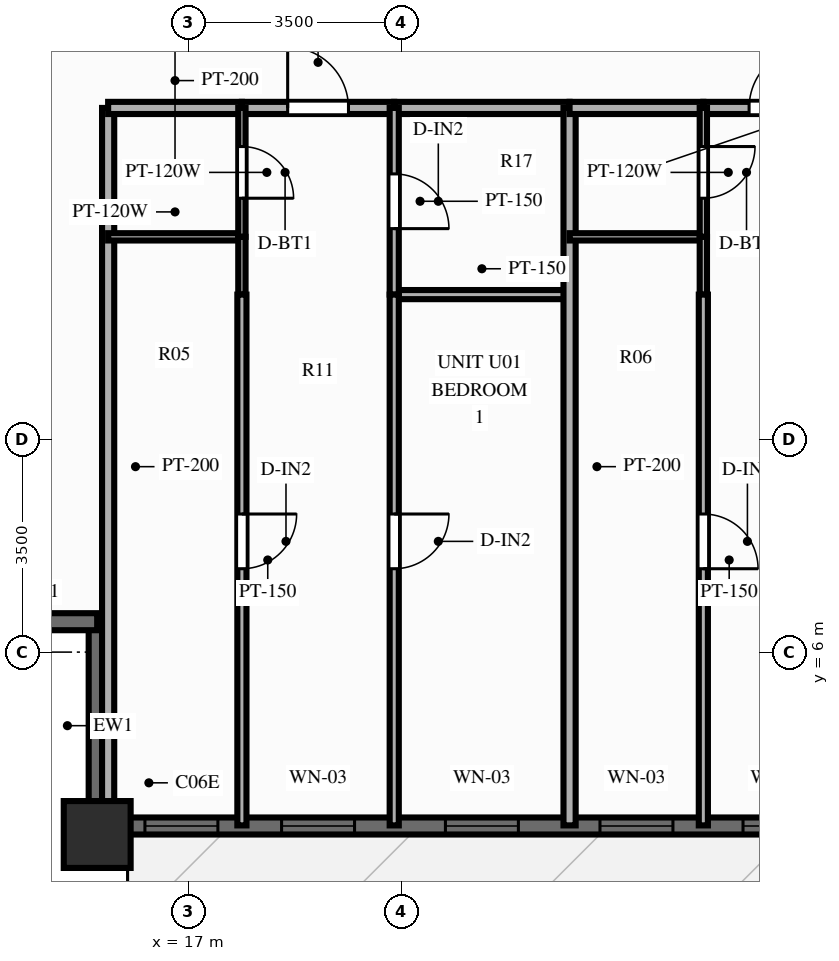
"""IFC4 building model, lengths in metres.
Left out: names, types, materials, properties, quantities, classifications, styles, units other than length and angle.
Written with IfcOpenShell. Run it as: python <this file> out.ifc"""

import sys

from ifc_helpers import new_model, si_unit, direction, frame, frame_2d, origin, origin_2d, place, context, subcontext, project, spatial, rectangle, extrude, source, transform, mapped, element, fill, save


model = new_model("IFC4")
c1 = context("Model", 3, precision=1e-05, world=origin(), true_north=direction((0.0, 1.0)))
c2 = subcontext(c1, "Body", "Model", "MODEL_VIEW")
j1 = project(units=[si_unit("LENGTHUNIT", "METRE"), si_unit("PLANEANGLEUNIT", "RADIAN")], contexts=[c1])
p1 = place(None, origin())
s1 = spatial("IfcSite", under=j1, at=p1, CompositionType="ELEMENT")
p2 = place(p1, origin())
s2 = spatial("IfcBuilding", under=s1, at=p2, CompositionType="ELEMENT")
p3 = place(p2, frame((0.0, 0.0, 22.4)))
s3 = spatial("IfcBuildingStorey", under=s2, at=p3, CompositionType="ELEMENT", Elevation=22.4)
m1 = source(origin(), c2, "Body", "SweptSolid", [
    extrude(rectangle(XDim=1.1, YDim=1.1, at=origin_2d()), origin(), (0.0, 0.0, 1.0), 3.0),
])
p4 = place(p3, frame((15.5, 3.0, 0.0), z_axis=(0.0, 0.0, 1.0), x_axis=(1.0, 0.0, 0.0)))
e1 = element("IfcColumn", 1, at=p4, inside=s3, PredefinedType="COLUMN", context=c2, shape_type="MappedRepresentation", body=[
    mapped(m1, transform((0.0, 0.0, 0.0), scale=1.0)),
])
p5 = place(p3, frame((15.5, 3.14, 0.0), z_axis=(0.0, 0.0, 1.0), x_axis=(1.0, 0.0, 0.0)))
e2 = element("IfcWall", 2, at=p5, inside=s3, PredefinedType="SOLIDWALL", context=c2, shape_type="SweptSolid", body=[
    extrude(rectangle(XDim=45.0, YDim=0.28, at=frame_2d((22.5, 0.0))), origin(), (0.0, 0.0, 1.0), 2.28),
])
p6 = place(p5, frame((0.785, 0.0, 0.25)))
e3 = element("IfcOpeningElement", 3, at=p6, cuts=e2, PredefinedType="OPENING", context=c2, shape_type="SweptSolid", body=[
    extrude(rectangle(XDim=1.2, YDim=1.5, at=frame_2d((0.6, 0.75))), frame((0.0, 0.152, 0.0), z_axis=(0.0, -1.0, 0.0), x_axis=(1.0, 0.0, 0.0)), (0.0, 0.0, 1.0), 0.304),
])
p7 = place(p5, frame((3.033, 0.0, 0.25)))
e4 = element("IfcOpeningElement", 4, at=p7, cuts=e2, PredefinedType="OPENING", context=c2, shape_type="SweptSolid", body=[
    extrude(rectangle(XDim=1.2, YDim=1.5, at=frame_2d((0.6, 0.75))), frame((0.0, 0.152, 0.0), z_axis=(0.0, -1.0, 0.0), x_axis=(1.0, 0.0, 0.0)), (0.0, 0.0, 1.0), 0.304),
])
p8 = place(p5, frame((5.727, 0.0, 0.25)))
e5 = element("IfcOpeningElement", 5, at=p8, cuts=e2, PredefinedType="OPENING", context=c2, shape_type="SweptSolid", body=[
    extrude(rectangle(XDim=1.2, YDim=1.5, at=frame_2d((0.6, 0.75))), frame((0.0, 0.152, 0.0), z_axis=(0.0, -1.0, 0.0), x_axis=(1.0, 0.0, 0.0)), (0.0, 0.0, 1.0), 0.304),
])
p9 = place(p5, frame((8.269, 0.0, 0.25)))
e6 = element("IfcOpeningElement", 6, at=p9, cuts=e2, PredefinedType="OPENING", context=c2, shape_type="SweptSolid", body=[
    extrude(rectangle(XDim=1.2, YDim=1.5, at=frame_2d((0.6, 0.75))), frame((0.0, 0.152, 0.0), z_axis=(0.0, -1.0, 0.0), x_axis=(1.0, 0.0, 0.0)), (0.0, 0.0, 1.0), 0.304),
])
p10 = place(p5, frame((10.621, 0.0, 0.25)))
e7 = element("IfcOpeningElement", 7, at=p10, cuts=e2, PredefinedType="OPENING", context=c2, shape_type="SweptSolid", body=[
    extrude(rectangle(XDim=1.2, YDim=1.5, at=frame_2d((0.6, 0.75))), frame((0.0, 0.152, 0.0), z_axis=(0.0, -1.0, 0.0), x_axis=(1.0, 0.0, 0.0)), (0.0, 0.0, 1.0), 0.304),
])
p11 = place(p5, frame((13.316, 0.0, 0.25)))
e8 = element("IfcOpeningElement", 8, at=p11, cuts=e2, PredefinedType="OPENING", context=c2, shape_type="SweptSolid", body=[
    extrude(rectangle(XDim=1.2, YDim=1.5, at=frame_2d((0.6, 0.75))), frame((0.0, 0.152, 0.0), z_axis=(0.0, -1.0, 0.0), x_axis=(1.0, 0.0, 0.0)), (0.0, 0.0, 1.0), 0.304),
])
p12 = place(p5, frame((16.624, 0.0, 0.25)))
e9 = element("IfcOpeningElement", 9, at=p12, cuts=e2, PredefinedType="OPENING", context=c2, shape_type="SweptSolid", body=[
    extrude(rectangle(XDim=0.7, YDim=1.5, at=frame_2d((0.35, 0.75))), frame((0.0, 0.152, 0.0), z_axis=(0.0, -1.0, 0.0), x_axis=(1.0, 0.0, 0.0)), (0.0, 0.0, 1.0), 0.304),
])
p13 = place(p5, frame((18.141, 0.0, 0.25)))
e10 = element("IfcOpeningElement", 10, at=p13, cuts=e2, PredefinedType="OPENING", context=c2, shape_type="SweptSolid", body=[
    extrude(rectangle(XDim=1.2, YDim=1.5, at=frame_2d((0.6, 0.75))), frame((0.0, 0.152, 0.0), z_axis=(0.0, -1.0, 0.0), x_axis=(1.0, 0.0, 0.0)), (0.0, 0.0, 1.0), 0.304),
])
p14 = place(p5, frame((21.874, 0.0, 0.0), z_axis=(0.0, 0.0, 1.0), x_axis=(-1.0, 0.0, 0.0)))
e11 = element("IfcOpeningElement", 11, at=p14, cuts=e2, PredefinedType="OPENING", context=c2, shape_type="SweptSolid", body=[
    extrude(rectangle(XDim=1.1, YDim=2.15, at=frame_2d((0.55, 1.075))), frame((0.0, 0.152, 0.0), z_axis=(0.0, -1.0, 0.0), x_axis=(1.0, 0.0, 0.0)), (0.0, 0.0, 1.0), 0.304),
])
p15 = place(p5, frame((23.223, 0.0, 0.25)))
e12 = element("IfcOpeningElement", 12, at=p15, cuts=e2, PredefinedType="OPENING", context=c2, shape_type="SweptSolid", body=[
    extrude(rectangle(XDim=1.2, YDim=1.5, at=frame_2d((0.6, 0.75))), frame((0.0, 0.152, 0.0), z_axis=(0.0, -1.0, 0.0), x_axis=(1.0, 0.0, 0.0)), (0.0, 0.0, 1.0), 0.304),
])
p16 = place(p5, frame((25.507, 0.0, 0.25)))
e13 = element("IfcOpeningElement", 13, at=p16, cuts=e2, PredefinedType="OPENING", context=c2, shape_type="SweptSolid", body=[
    extrude(rectangle(XDim=1.2, YDim=1.5, at=frame_2d((0.6, 0.75))), frame((0.0, 0.152, 0.0), z_axis=(0.0, -1.0, 0.0), x_axis=(1.0, 0.0, 0.0)), (0.0, 0.0, 1.0), 0.304),
])
p17 = place(p5, frame((27.6, 0.0, 0.25)))
e14 = element("IfcOpeningElement", 14, at=p17, cuts=e2, PredefinedType="OPENING", context=c2, shape_type="SweptSolid", body=[
    extrude(rectangle(XDim=0.7, YDim=1.5, at=frame_2d((0.35, 0.75))), frame((0.0, 0.152, 0.0), z_axis=(0.0, -1.0, 0.0), x_axis=(1.0, 0.0, 0.0)), (0.0, 0.0, 1.0), 0.304),
])
p18 = place(p5, frame((30.589, 0.0, 0.25)))
e15 = element("IfcOpeningElement", 15, at=p18, cuts=e2, PredefinedType="OPENING", context=c2, shape_type="SweptSolid", body=[
    extrude(rectangle(XDim=1.2, YDim=1.5, at=frame_2d((0.6, 0.75))), frame((0.0, 0.152, 0.0), z_axis=(0.0, -1.0, 0.0), x_axis=(1.0, 0.0, 0.0)), (0.0, 0.0, 1.0), 0.304),
])
p19 = place(p5, frame((32.872, 0.0, 0.25)))
e16 = element("IfcOpeningElement", 16, at=p19, cuts=e2, PredefinedType="OPENING", context=c2, shape_type="SweptSolid", body=[
    extrude(rectangle(XDim=1.2, YDim=1.5, at=frame_2d((0.6, 0.75))), frame((0.0, 0.152, 0.0), z_axis=(0.0, -1.0, 0.0), x_axis=(1.0, 0.0, 0.0)), (0.0, 0.0, 1.0), 0.304),
])
p20 = place(p5, frame((35.455, 0.0, 0.25)))
e17 = element("IfcOpeningElement", 17, at=p20, cuts=e2, PredefinedType="OPENING", context=c2, shape_type="SweptSolid", body=[
    extrude(rectangle(XDim=1.2, YDim=1.5, at=frame_2d((0.6, 0.75))), frame((0.0, 0.152, 0.0), z_axis=(0.0, -1.0, 0.0), x_axis=(1.0, 0.0, 0.0)), (0.0, 0.0, 1.0), 0.304),
])
p21 = place(p5, frame((37.954, 0.0, 0.25)))
e18 = element("IfcOpeningElement", 18, at=p21, cuts=e2, PredefinedType="OPENING", context=c2, shape_type="SweptSolid", body=[
    extrude(rectangle(XDim=1.2, YDim=1.5, at=frame_2d((0.6, 0.75))), frame((0.0, 0.152, 0.0), z_axis=(0.0, -1.0, 0.0), x_axis=(1.0, 0.0, 0.0)), (0.0, 0.0, 1.0), 0.304),
])
p22 = place(p5, frame((40.238, 0.0, 0.25)))
e19 = element("IfcOpeningElement", 19, at=p22, cuts=e2, PredefinedType="OPENING", context=c2, shape_type="SweptSolid", body=[
    extrude(rectangle(XDim=1.2, YDim=1.5, at=frame_2d((0.6, 0.75))), frame((0.0, 0.152, 0.0), z_axis=(0.0, -1.0, 0.0), x_axis=(1.0, 0.0, 0.0)), (0.0, 0.0, 1.0), 0.304),
])
p23 = place(p5, frame((42.716, 0.0, 0.25)))
e20 = element("IfcOpeningElement", 20, at=p23, cuts=e2, PredefinedType="OPENING", context=c2, shape_type="SweptSolid", body=[
    extrude(rectangle(XDim=1.2, YDim=1.5, at=frame_2d((0.6, 0.75))), frame((0.0, 0.152, 0.0), z_axis=(0.0, -1.0, 0.0), x_axis=(1.0, 0.0, 0.0)), (0.0, 0.0, 1.0), 0.304),
])
for number, where, z_axis, x_axis in (
    (21, (15.5, 3.08, 0.0), (0.0, 0.0, 1.0), (0.0, 1.0, 0.0)),
    (22, (12.08, 6.5, 0.0), (0.0, 0.0, 1.0), (1.0, 0.0, 0.0)),
):
    element("IfcWall", number, at=place(p3, frame(where, z_axis=z_axis, x_axis=x_axis)), inside=s3, PredefinedType="SOLIDWALL", context=c2, shape_type="SweptSolid", body=[
        extrude(rectangle(XDim=3.42, YDim=0.28, at=frame_2d((1.71, 0.0))), origin(), (0.0, 0.0, 1.0), 2.28),
    ])
p24 = place(p3, frame((15.68, 14.95, 0.0), z_axis=(0.0, 0.0, 1.0), x_axis=(0.0, -1.0, 0.0)))
e23 = element("IfcWall", 23, at=p24, inside=s3, PredefinedType="PARTITIONING", context=c2, shape_type="SweptSolid", body=[
    extrude(rectangle(XDim=11.8, YDim=0.2, at=frame_2d((5.9, 0.0))), origin(), (0.0, 0.0, 1.0), 2.79),
])
p25 = place(p3, frame((15.68, 14.95, 0.0), z_axis=(0.0, 0.0, 1.0), x_axis=(1.0, 0.0, 0.0)))
e24 = element("IfcWall", 24, at=p25, inside=s3, PredefinedType="PARTITIONING", context=c2, shape_type="SweptSolid", body=[
    extrude(rectangle(XDim=2.2, YDim=0.2, at=frame_2d((1.1, 0.0))), origin(), (0.0, 0.0, 1.0), 2.79),
])
p26 = place(p3, frame((17.88, 14.95, 0.0), z_axis=(0.0, 0.0, 1.0), x_axis=(1.0, 0.0, 0.0)))
e25 = element("IfcWall", 25, at=p26, inside=s3, PredefinedType="PARTITIONING", context=c2, shape_type="SweptSolid", body=[
    extrude(rectangle(XDim=2.505, YDim=0.2, at=frame_2d((1.252, 0.0))), origin(), (0.0, 0.0, 1.0), 2.79),
])
p27 = place(p26, frame((0.753, 0.0, 0.0)))
e26 = element("IfcOpeningElement", 26, at=p27, cuts=e25, PredefinedType="OPENING", context=c2, shape_type="SweptSolid", body=[
    extrude(rectangle(XDim=1.0, YDim=2.15, at=frame_2d((0.5, 1.075))), frame((0.0, 0.112, 0.0), z_axis=(0.0, -1.0, 0.0), x_axis=(1.0, 0.0, 0.0)), (0.0, 0.0, 1.0), 0.224),
])
p28 = place(p3, frame((20.385, 14.95, 0.0), z_axis=(0.0, 0.0, 1.0), x_axis=(1.0, 0.0, 0.0)))
e27 = element("IfcWall", 27, at=p28, inside=s3, PredefinedType="PARTITIONING", context=c2, shape_type="SweptSolid", body=[
    extrude(rectangle(XDim=2.884, YDim=0.2, at=frame_2d((1.442, 0.0))), origin(), (0.0, 0.0, 1.0), 2.79),
])
p29 = place(p3, frame((15.68, 12.83, 0.0), z_axis=(0.0, 0.0, 1.0), x_axis=(1.0, 0.0, 0.0)))
e28 = element("IfcWall", 28, at=p29, inside=s3, PredefinedType="PARTITIONING", context=c2, shape_type="SweptSolid", body=[
    extrude(rectangle(XDim=2.2, YDim=0.12, at=frame_2d((1.1, 0.0))), origin(), (0.0, 0.0, 1.0), 2.79),
])
p30 = place(p3, frame((20.385, 11.88, 0.0), z_axis=(0.0, 0.0, 1.0), x_axis=(1.0, 0.0, 0.0)))
e29 = element("IfcWall", 29, at=p30, inside=s3, PredefinedType="PARTITIONING", context=c2, shape_type="SweptSolid", body=[
    extrude(rectangle(XDim=2.884, YDim=0.15, at=frame_2d((1.442, 0.0))), origin(), (0.0, 0.0, 1.0), 2.79),
])
p31 = place(p3, frame((17.88, 14.95, 0.0), z_axis=(0.0, 0.0, 1.0), x_axis=(0.0, -1.0, 0.0)))
e30 = element("IfcWall", 30, at=p31, inside=s3, PredefinedType="PARTITIONING", context=c2, shape_type="SweptSolid", body=[
    extrude(rectangle(XDim=2.12, YDim=0.12, at=frame_2d((1.06, 0.0))), origin(), (0.0, 0.0, 1.0), 2.79),
])
p32 = place(p31, frame((0.635, 0.0, 0.0)))
e31 = element("IfcOpeningElement", 31, at=p32, cuts=e30, PredefinedType="OPENING", context=c2, shape_type="SweptSolid", body=[
    extrude(rectangle(XDim=0.85, YDim=2.05, at=frame_2d((0.425, 1.025))), frame((0.0, 0.072, 0.0), z_axis=(0.0, -1.0, 0.0), x_axis=(1.0, 0.0, 0.0)), (0.0, 0.0, 1.0), 0.144),
])
p33 = place(p3, frame((17.88, 12.83, 0.0), z_axis=(0.0, 0.0, 1.0), x_axis=(0.0, -1.0, 0.0)))
e32 = element("IfcWall", 32, at=p33, inside=s3, PredefinedType="PARTITIONING", context=c2, shape_type="SweptSolid", body=[
    extrude(rectangle(XDim=0.95, YDim=0.12, at=frame_2d((0.475, 0.0))), origin(), (0.0, 0.0, 1.0), 2.79),
])
p34 = place(p3, frame((17.88, 11.88, 0.0), z_axis=(0.0, 0.0, 1.0), x_axis=(0.0, -1.0, 0.0)))
e33 = element("IfcWall", 33, at=p34, inside=s3, PredefinedType="PARTITIONING", context=c2, shape_type="SweptSolid", body=[
    extrude(rectangle(XDim=8.73, YDim=0.15, at=frame_2d((4.365, 0.0))), origin(), (0.0, 0.0, 1.0), 2.79),
])
p35 = place(p34, frame((3.609, 0.0, 0.0)))
e34 = element("IfcOpeningElement", 34, at=p35, cuts=e33, PredefinedType="OPENING", context=c2, shape_type="SweptSolid", body=[
    extrude(rectangle(XDim=0.9, YDim=2.1, at=frame_2d((0.45, 1.05))), frame((0.0, 0.087, 0.0), z_axis=(0.0, -1.0, 0.0), x_axis=(1.0, 0.0, 0.0)), (0.0, 0.0, 1.0), 0.174),
])
p36 = place(p3, frame((20.385, 14.95, 0.0), z_axis=(0.0, 0.0, 1.0), x_axis=(0.0, -1.0, 0.0)))
e35 = element("IfcWall", 35, at=p36, inside=s3, PredefinedType="PARTITIONING", context=c2, shape_type="SweptSolid", body=[
    extrude(rectangle(XDim=3.07, YDim=0.15, at=frame_2d((1.535, 0.0))), origin(), (0.0, 0.0, 1.0), 2.79),
])
p37 = place(p36, frame((1.085, 0.0, 0.0)))
e36 = element("IfcOpeningElement", 36, at=p37, cuts=e35, PredefinedType="OPENING", context=c2, shape_type="SweptSolid", body=[
    extrude(rectangle(XDim=0.9, YDim=2.1, at=frame_2d((0.45, 1.05))), frame((0.0, 0.087, 0.0), z_axis=(0.0, -1.0, 0.0), x_axis=(1.0, 0.0, 0.0)), (0.0, 0.0, 1.0), 0.174),
])
p38 = place(p3, frame((20.385, 11.88, 0.0), z_axis=(0.0, 0.0, 1.0), x_axis=(0.0, -1.0, 0.0)))
e37 = element("IfcWall", 37, at=p38, inside=s3, PredefinedType="PARTITIONING", context=c2, shape_type="SweptSolid", body=[
    extrude(rectangle(XDim=8.73, YDim=0.15, at=frame_2d((4.365, 0.0))), origin(), (0.0, 0.0, 1.0), 2.79),
])
p39 = place(p38, frame((3.609, 0.0, 0.0)))
e38 = element("IfcOpeningElement", 38, at=p39, cuts=e37, PredefinedType="OPENING", context=c2, shape_type="SweptSolid", body=[
    extrude(rectangle(XDim=0.9, YDim=2.1, at=frame_2d((0.45, 1.05))), frame((0.0, 0.087, 0.0), z_axis=(0.0, -1.0, 0.0), x_axis=(1.0, 0.0, 0.0)), (0.0, 0.0, 1.0), 0.174),
])
p40 = place(p3, frame((23.269, 14.95, 0.0), z_axis=(0.0, 0.0, 1.0), x_axis=(0.0, -1.0, 0.0)))
e39 = element("IfcWall", 39, at=p40, inside=s3, PredefinedType="PARTITIONING", context=c2, shape_type="SweptSolid", body=[
    extrude(rectangle(XDim=11.8, YDim=0.2, at=frame_2d((5.9, 0.0))), origin(), (0.0, 0.0, 1.0), 2.79),
])
p41 = place(p3, frame((23.269, 14.95, 0.0), z_axis=(0.0, 0.0, 1.0), x_axis=(1.0, 0.0, 0.0)))
e40 = element("IfcWall", 40, at=p41, inside=s3, PredefinedType="PARTITIONING", context=c2, shape_type="SweptSolid", body=[
    extrude(rectangle(XDim=2.2, YDim=0.2, at=frame_2d((1.1, 0.0))), origin(), (0.0, 0.0, 1.0), 2.79),
])
p42 = place(p3, frame((25.469, 14.95, 0.0), z_axis=(0.0, 0.0, 1.0), x_axis=(1.0, 0.0, 0.0)))
e41 = element("IfcWall", 41, at=p42, inside=s3, PredefinedType="PARTITIONING", context=c2, shape_type="SweptSolid", body=[
    extrude(rectangle(XDim=2.505, YDim=0.2, at=frame_2d((1.252, 0.0))), origin(), (0.0, 0.0, 1.0), 2.79),
])
p43 = place(p42, frame((0.752, 0.0, 0.0)))
e42 = element("IfcOpeningElement", 42, at=p43, cuts=e41, PredefinedType="OPENING", context=c2, shape_type="SweptSolid", body=[
    extrude(rectangle(XDim=1.0, YDim=2.15, at=frame_2d((0.5, 1.075))), frame((0.0, 0.112, 0.0), z_axis=(0.0, -1.0, 0.0), x_axis=(1.0, 0.0, 0.0)), (0.0, 0.0, 1.0), 0.224),
])
p44 = place(p3, frame((23.269, 12.83, 0.0), z_axis=(0.0, 0.0, 1.0), x_axis=(1.0, 0.0, 0.0)))
e43 = element("IfcWall", 43, at=p44, inside=s3, PredefinedType="PARTITIONING", context=c2, shape_type="SweptSolid", body=[
    extrude(rectangle(XDim=2.2, YDim=0.12, at=frame_2d((1.1, 0.0))), origin(), (0.0, 0.0, 1.0), 2.79),
])
p45 = place(p3, frame((25.469, 14.95, 0.0), z_axis=(0.0, 0.0, 1.0), x_axis=(0.0, -1.0, 0.0)))
e44 = element("IfcWall", 44, at=p45, inside=s3, PredefinedType="PARTITIONING", context=c2, shape_type="SweptSolid", body=[
    extrude(rectangle(XDim=2.12, YDim=0.12, at=frame_2d((1.06, 0.0))), origin(), (0.0, 0.0, 1.0), 2.79),
])
p46 = place(p45, frame((0.635, 0.0, 0.0)))
e45 = element("IfcOpeningElement", 45, at=p46, cuts=e44, PredefinedType="OPENING", context=c2, shape_type="SweptSolid", body=[
    extrude(rectangle(XDim=0.85, YDim=2.05, at=frame_2d((0.425, 1.025))), frame((0.0, 0.072, 0.0), z_axis=(0.0, -1.0, 0.0), x_axis=(1.0, 0.0, 0.0)), (0.0, 0.0, 1.0), 0.144),
])
p47 = place(p3, frame((25.469, 12.83, 0.0), z_axis=(0.0, 0.0, 1.0), x_axis=(0.0, -1.0, 0.0)))
e46 = element("IfcWall", 46, at=p47, inside=s3, PredefinedType="PARTITIONING", context=c2, shape_type="SweptSolid", body=[
    extrude(rectangle(XDim=0.95, YDim=0.12, at=frame_2d((0.475, 0.0))), origin(), (0.0, 0.0, 1.0), 2.79),
])
p48 = place(p3, frame((25.469, 11.88, 0.0), z_axis=(0.0, 0.0, 1.0), x_axis=(0.0, -1.0, 0.0)))
e47 = element("IfcWall", 47, at=p48, inside=s3, PredefinedType="PARTITIONING", context=c2, shape_type="SweptSolid", body=[
    extrude(rectangle(XDim=8.73, YDim=0.15, at=frame_2d((4.365, 0.0))), origin(), (0.0, 0.0, 1.0), 2.79),
])
p49 = place(p48, frame((3.609, 0.0, 0.0)))
e48 = element("IfcOpeningElement", 48, at=p49, cuts=e47, PredefinedType="OPENING", context=c2, shape_type="SweptSolid", body=[
    extrude(rectangle(XDim=0.9, YDim=2.1, at=frame_2d((0.45, 1.05))), frame((0.0, 0.087, 0.0), z_axis=(0.0, -1.0, 0.0), x_axis=(1.0, 0.0, 0.0)), (0.0, 0.0, 1.0), 0.174),
])
m2 = source(origin(), c2, "Body", "SweptSolid", [
    extrude(rectangle(XDim=1.2, YDim=1.5, at=frame_2d((0.6, 0.75))), frame((0.0, 0.03, 0.0), z_axis=(0.0, -1.0, 0.0), x_axis=(1.0, 0.0, 0.0)), (0.0, 0.0, 1.0), 0.06),
])
p50 = place(p6, origin())
e49 = element("IfcWindow", 49, at=p50, inside=s3, PartitioningType="SINGLE_PANEL", PredefinedType="WINDOW", context=c2, shape_type="MappedRepresentation", body=[
    mapped(m2, transform((0.0, 0.0, 0.0), scale=1.0)),
])
fill(e3, e49)
p51 = place(p7, origin())
e50 = element("IfcWindow", 50, at=p51, inside=s3, PartitioningType="SINGLE_PANEL", PredefinedType="WINDOW", context=c2, shape_type="MappedRepresentation", body=[
    mapped(m2, transform((0.0, 0.0, 0.0), scale=1.0)),
])
fill(e4, e50)
p52 = place(p8, origin())
e51 = element("IfcWindow", 51, at=p52, inside=s3, PartitioningType="SINGLE_PANEL", PredefinedType="WINDOW", context=c2, shape_type="MappedRepresentation", body=[
    mapped(m2, transform((0.0, 0.0, 0.0), scale=1.0)),
])
fill(e5, e51)
p53 = place(p9, origin())
e52 = element("IfcWindow", 52, at=p53, inside=s3, PartitioningType="SINGLE_PANEL", PredefinedType="WINDOW", context=c2, shape_type="MappedRepresentation", body=[
    mapped(m2, transform((0.0, 0.0, 0.0), scale=1.0)),
])
fill(e6, e52)
p54 = place(p10, origin())
e53 = element("IfcWindow", 53, at=p54, inside=s3, PartitioningType="SINGLE_PANEL", PredefinedType="WINDOW", context=c2, shape_type="MappedRepresentation", body=[
    mapped(m2, transform((0.0, 0.0, 0.0), scale=1.0)),
])
fill(e7, e53)
m3 = source(origin(), c2, "Body", "SweptSolid", [
    extrude(rectangle(XDim=1.0, YDim=2.15, at=frame_2d((0.5, 1.075))), frame((0.0, 0.025, 0.0), z_axis=(0.0, -1.0, 0.0), x_axis=(1.0, 0.0, 0.0)), (0.0, 0.0, 1.0), 0.05),
])
p55 = place(p27, origin())
e54 = element("IfcDoor", 54, at=p55, inside=s3, OperationType="SINGLE_SWING_LEFT", PredefinedType="DOOR", context=c2, shape_type="MappedRepresentation", body=[
    mapped(m3, transform((0.0, 0.0, 0.0), scale=1.0)),
])
fill(e26, e54)
m4 = source(origin(), c2, "Body", "SweptSolid", [
    extrude(rectangle(XDim=0.85, YDim=2.05, at=frame_2d((0.425, 1.025))), frame((0.0, 0.025, 0.0), z_axis=(0.0, -1.0, 0.0), x_axis=(1.0, 0.0, 0.0)), (0.0, 0.0, 1.0), 0.05),
])
p56 = place(p32, origin())
e55 = element("IfcDoor", 55, at=p56, inside=s3, OperationType="SINGLE_SWING_RIGHT", PredefinedType="DOOR", context=c2, shape_type="MappedRepresentation", body=[
    mapped(m4, transform((0.0, 0.0, 0.0), scale=1.0)),
])
fill(e31, e55)
m5 = source(origin(), c2, "Body", "SweptSolid", [
    extrude(rectangle(XDim=0.9, YDim=2.1, at=frame_2d((0.45, 1.05))), frame((0.0, 0.025, 0.0), z_axis=(0.0, -1.0, 0.0), x_axis=(1.0, 0.0, 0.0)), (0.0, 0.0, 1.0), 0.05),
])
p57 = place(p35, origin())
e56 = element("IfcDoor", 56, at=p57, inside=s3, OperationType="SINGLE_SWING_LEFT", PredefinedType="DOOR", context=c2, shape_type="MappedRepresentation", body=[
    mapped(m5, transform((0.0, 0.0, 0.0), scale=1.0)),
])
fill(e34, e56)
p58 = place(p37, origin())
e57 = element("IfcDoor", 57, at=p58, inside=s3, OperationType="SINGLE_SWING_RIGHT", PredefinedType="DOOR", context=c2, shape_type="MappedRepresentation", body=[
    mapped(m5, transform((0.0, 0.0, 0.0), scale=1.0)),
])
fill(e36, e57)
p59 = place(p39, origin())
e58 = element("IfcDoor", 58, at=p59, inside=s3, OperationType="SINGLE_SWING_LEFT", PredefinedType="DOOR", context=c2, shape_type="MappedRepresentation", body=[
    mapped(m5, transform((0.0, 0.0, 0.0), scale=1.0)),
])
fill(e38, e58)
p60 = place(p43, origin())
e59 = element("IfcDoor", 59, at=p60, inside=s3, OperationType="SINGLE_SWING_RIGHT", PredefinedType="DOOR", context=c2, shape_type="MappedRepresentation", body=[
    mapped(m3, transform((0.0, 0.0, 0.0), scale=1.0)),
])
fill(e42, e59)
p61 = place(p46, origin())
e60 = element("IfcDoor", 60, at=p61, inside=s3, OperationType="SINGLE_SWING_LEFT", PredefinedType="DOOR", context=c2, shape_type="MappedRepresentation", body=[
    mapped(m4, transform((0.0, 0.0, 0.0), scale=1.0)),
])
fill(e45, e60)
p62 = place(p49, origin())
e61 = element("IfcDoor", 61, at=p62, inside=s3, OperationType="SINGLE_SWING_RIGHT", PredefinedType="DOOR", context=c2, shape_type="MappedRepresentation", body=[
    mapped(m5, transform((0.0, 0.0, 0.0), scale=1.0)),
])
fill(e48, e61)
save(model, sys.argv[1])
